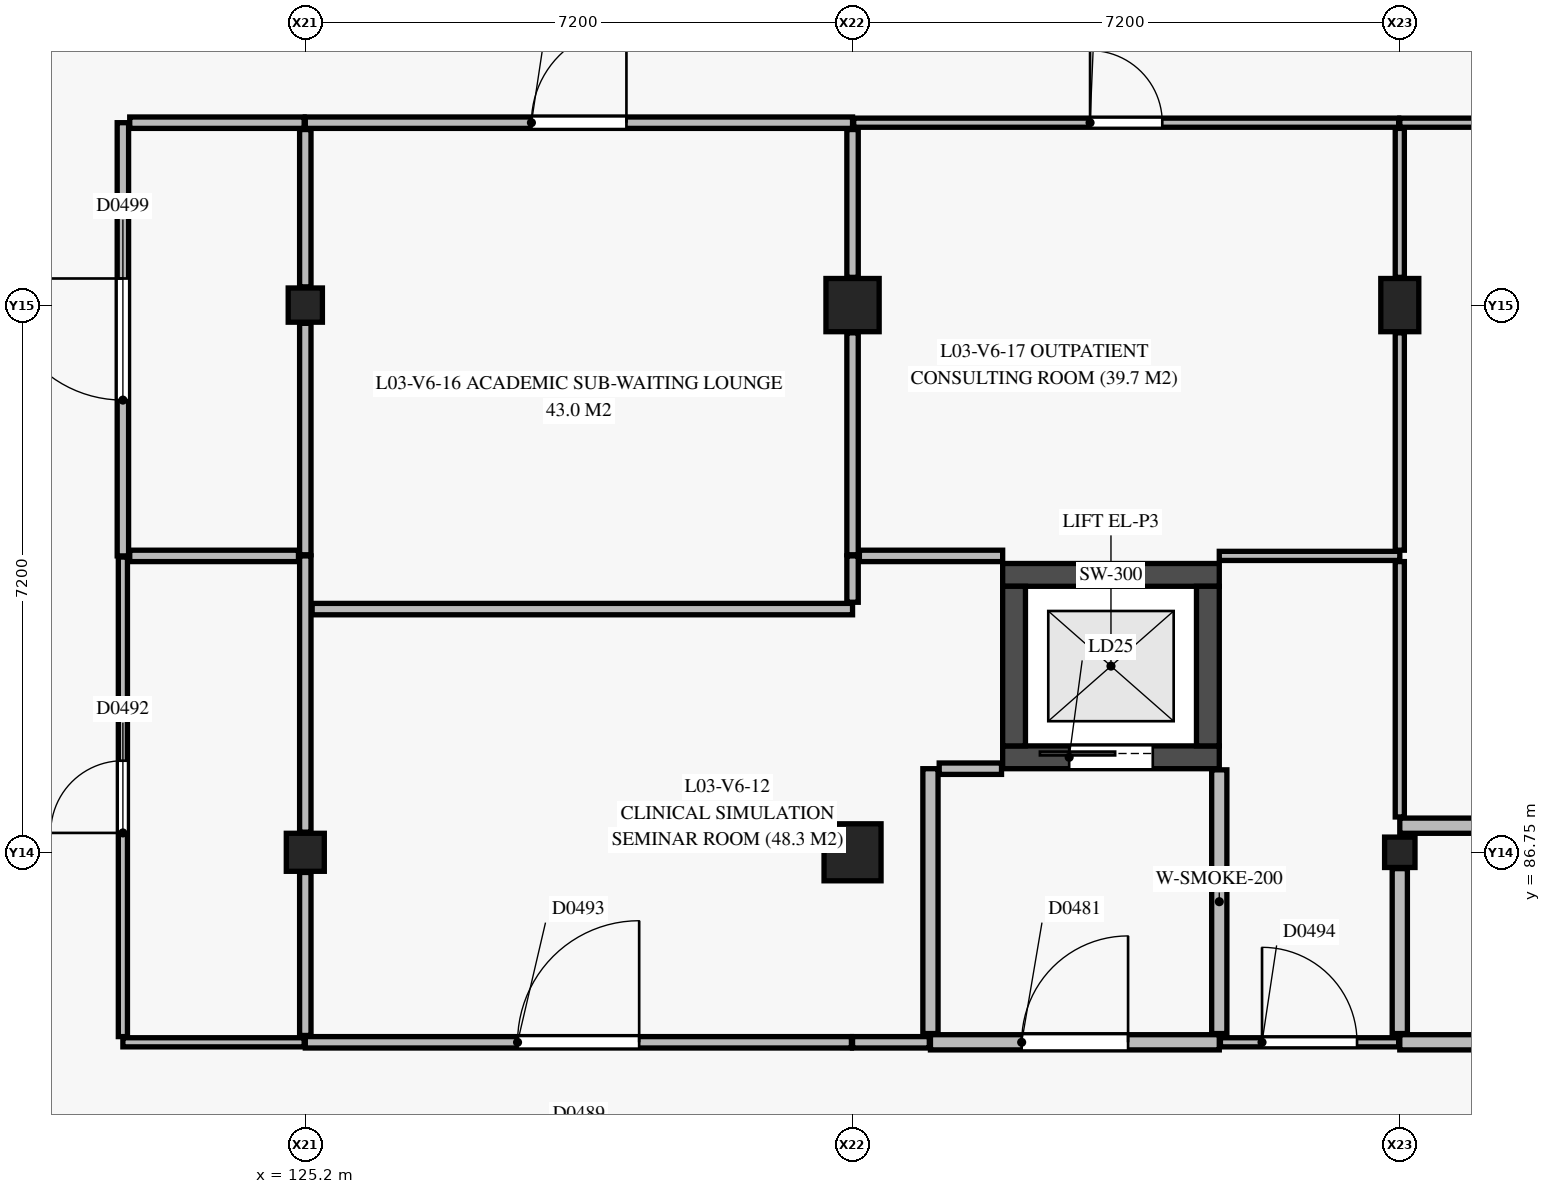
"""IFC4 building model, lengths in metres.
Left out: names, types, materials, properties, quantities, classifications, styles, units other than length and angle.
Written with IfcOpenShell. Run it as: python <this file> out.ifc"""

import sys

from ifc_helpers import new_model, si_unit, direction, frame, frame_2d, origin, origin_2d, place, context, subcontext, project, spatial, rectangle, extrude, element, fill, save


model = new_model("IFC4")
c1 = context("Model", 3, precision=1e-05, world=origin(), true_north=direction((0.0, 1.0)))
c2 = subcontext(c1, "Body", "Model", "MODEL_VIEW")
j1 = project(units=[si_unit("LENGTHUNIT", "METRE"), si_unit("PLANEANGLEUNIT", "RADIAN")], contexts=[c1])
p1 = place(None, origin())
s1 = spatial("IfcSite", under=j1, at=p1, CompositionType="ELEMENT")
p2 = place(p1, origin())
s2 = spatial("IfcBuilding", under=s1, at=p2, CompositionType="ELEMENT")
p3 = place(p2, frame((0.0, 0.0, 13.2)))
s3 = spatial("IfcBuildingStorey", under=s2, at=p3, CompositionType="ELEMENT", Elevation=13.2)
p4 = place(p3, frame((125.2, 86.75, 0.0), z_axis=(0.0, 0.0, 1.0), x_axis=(1.0, 0.0, 0.0)))
e1 = element("IfcColumn", 1, at=p4, inside=s3, PredefinedType="COLUMN", context=c2, shape_type="SweptSolid", body=[
    extrude(rectangle(XDim=0.5, YDim=0.5, at=origin_2d()), origin(), (0.0, 0.0, 1.0), 4.2),
])
p5 = place(p3, frame((125.2, 93.95, 0.0), z_axis=(0.0, 0.0, 1.0), x_axis=(1.0, 0.0, 0.0)))
e2 = element("IfcColumn", 2, at=p5, inside=s3, PredefinedType="COLUMN", context=c2, shape_type="SweptSolid", body=[
    extrude(rectangle(XDim=0.45, YDim=0.45, at=origin_2d()), origin(), (0.0, 0.0, 1.0), 4.2),
])
p6 = place(p3, frame((132.4, 86.75, 0.0), z_axis=(0.0, 0.0, 1.0), x_axis=(1.0, 0.0, 0.0)))
e3 = element("IfcColumn", 3, at=p6, inside=s3, PredefinedType="COLUMN", context=c2, shape_type="SweptSolid", body=[
    extrude(rectangle(XDim=0.75, YDim=0.75, at=origin_2d()), origin(), (0.0, 0.0, 1.0), 4.2),
])
p7 = place(p3, frame((132.4, 93.95, 0.0), z_axis=(0.0, 0.0, 1.0), x_axis=(1.0, 0.0, 0.0)))
e4 = element("IfcColumn", 4, at=p7, inside=s3, PredefinedType="COLUMN", context=c2, shape_type="SweptSolid", body=[
    extrude(rectangle(XDim=0.7, YDim=0.7, at=origin_2d()), origin(), (0.0, 0.0, 1.0), 4.2),
])
p8 = place(p3, frame((139.6, 86.75, 0.0), z_axis=(0.0, 0.0, 1.0), x_axis=(1.0, 0.0, 0.0)))
e5 = element("IfcColumn", 5, at=p8, inside=s3, PredefinedType="COLUMN", context=c2, shape_type="SweptSolid", body=[
    extrude(rectangle(XDim=0.4, YDim=0.4, at=origin_2d()), origin(), (0.0, 0.0, 1.0), 4.2),
])
p9 = place(p3, frame((139.6, 93.95, 0.0), z_axis=(0.0, 0.0, 1.0), x_axis=(1.0, 0.0, 0.0)))
e6 = element("IfcColumn", 6, at=p9, inside=s3, PredefinedType="COLUMN", context=c2, shape_type="SweptSolid", body=[
    extrude(rectangle(XDim=0.5, YDim=0.7, at=origin_2d()), origin(), (0.0, 0.0, 1.0), 4.2),
])
p10 = place(p3, frame((134.375, 88.0, 0.0), z_axis=(0.0, 0.0, 1.0), x_axis=(1.0, 0.0, 0.0)))
e7 = element("IfcWall", 7, at=p10, inside=s3, PredefinedType="SHEAR", context=c2, shape_type="SweptSolid", body=[
    extrude(rectangle(XDim=2.85, YDim=0.3, at=frame_2d((1.425, 0.0))), origin(), (0.0, 0.0, 1.0), 3.95),
])
p11 = place(p10, frame((0.875, 0.0, 0.0)))
e8 = element("IfcOpeningElement", 8, at=p11, cuts=e7, PredefinedType="OPENING", context=c2, shape_type="SweptSolid", body=[
    extrude(rectangle(XDim=1.1, YDim=2.15, at=frame_2d((0.55, 1.075))), frame((0.0, 0.16, 0.0), z_axis=(0.0, -1.0, 0.0), x_axis=(1.0, 0.0, 0.0)), (0.0, 0.0, 1.0), 0.32),
])
p12 = place(p3, frame((134.375, 90.4, 0.0), z_axis=(0.0, 0.0, 1.0), x_axis=(1.0, 0.0, 0.0)))
e9 = element("IfcWall", 9, at=p12, inside=s3, PredefinedType="SHEAR", context=c2, shape_type="SweptSolid", body=[
    extrude(rectangle(XDim=2.85, YDim=0.3, at=frame_2d((1.425, 0.0))), origin(), (0.0, 0.0, 1.0), 3.95),
])
for number, where, z_axis, x_axis in (
    (10, (134.525, 88.15, 0.0), (0.0, 0.0, 1.0), (0.0, 1.0, 0.0)),
    (11, (137.075, 88.15, 0.0), (0.0, 0.0, 1.0), (0.0, 1.0, 0.0)),
):
    element("IfcWall", number, at=place(p3, frame(where, z_axis=z_axis, x_axis=x_axis)), inside=s3, PredefinedType="SHEAR", context=c2, shape_type="SweptSolid", body=[
        extrude(rectangle(XDim=2.1, YDim=0.3, at=frame_2d((1.05, 0.0))), origin(), (0.0, 0.0, 1.0), 3.95),
    ])
p13 = place(p3, frame((133.425, 84.25, 0.0), z_axis=(0.0, 0.0, 1.0), x_axis=(1.0, 0.0, 0.0)))
e12 = element("IfcWall", 12, at=p13, inside=s3, PredefinedType="PARTITIONING", context=c2, shape_type="SweptSolid", body=[
    extrude(rectangle(XDim=3.8, YDim=0.2, at=frame_2d((1.9, 0.0))), origin(), (0.0, 0.0, 1.0), 3.475),
])
p14 = place(p13, frame((1.2, 0.0, 0.0)))
e13 = element("IfcOpeningElement", 13, at=p14, cuts=e12, PredefinedType="OPENING", context=c2, shape_type="SweptSolid", body=[
    extrude(rectangle(XDim=1.4, YDim=2.2, at=frame_2d((0.7, 1.1))), frame((0.0, 0.11, 0.0), z_axis=(0.0, -1.0, 0.0), x_axis=(1.0, 0.0, 0.0)), (0.0, 0.0, 1.0), 0.22),
])
p15 = place(p3, frame((137.225, 84.365, 0.0), z_axis=(0.0, 0.0, 1.0), x_axis=(0.0, 1.0, 0.0)))
e14 = element("IfcWall", 14, at=p15, inside=s3, PredefinedType="PARTITIONING", context=c2, shape_type="SweptSolid", body=[
    extrude(rectangle(XDim=3.47, YDim=0.2, at=frame_2d((1.735, 0.0))), origin(), (0.0, 0.0, 1.0), 3.415),
])
p16 = place(p3, frame((133.425, 84.365, 0.0), z_axis=(0.0, 0.0, 1.0), x_axis=(0.0, 1.0, 0.0)))
e15 = element("IfcWall", 15, at=p16, inside=s3, PredefinedType="PARTITIONING", context=c2, shape_type="SweptSolid", body=[
    extrude(rectangle(XDim=3.485, YDim=0.2, at=frame_2d((1.743, 0.0))), origin(), (0.0, 0.0, 1.0), 3.415),
])
p17 = place(p3, frame((139.6, 84.25, 0.0), z_axis=(0.0, 0.0, 1.0), x_axis=(1.0, 0.0, 0.0)))
e16 = element("IfcWall", 16, at=p17, inside=s3, PredefinedType="PARTITIONING", context=c2, shape_type="SweptSolid", body=[
    extrude(rectangle(XDim=4.685, YDim=0.2, at=frame_2d((2.342, 0.0))), origin(), (0.0, 0.0, 1.0), 3.355),
])
p18 = place(p3, frame((132.4, 84.25, 0.0), z_axis=(0.0, 0.0, 1.0), x_axis=(1.0, 0.0, 0.0)))
e17 = element("IfcWall", 17, at=p18, inside=s3, PredefinedType="PARTITIONING", context=c2, shape_type="SweptSolid", body=[
    extrude(rectangle(XDim=1.01, YDim=0.15, at=frame_2d((0.505, 0.0))), origin(), (0.0, 0.0, 1.0), 3.135),
])
p19 = place(p3, frame((125.2, 84.25, 0.0), z_axis=(0.0, 0.0, 1.0), x_axis=(1.0, 0.0, 0.0)))
e18 = element("IfcWall", 18, at=p19, inside=s3, PredefinedType="PARTITIONING", context=c2, shape_type="SweptSolid", body=[
    extrude(rectangle(XDim=7.185, YDim=0.15, at=frame_2d((3.593, 0.0))), origin(), (0.0, 0.0, 1.0), 3.135),
])
p20 = place(p19, frame((2.792, 0.0, 0.0)))
e19 = element("IfcOpeningElement", 19, at=p20, cuts=e18, PredefinedType="OPENING", context=c2, shape_type="SweptSolid", body=[
    extrude(rectangle(XDim=1.6, YDim=2.25, at=frame_2d((0.8, 1.125))), frame((0.0, 0.085, 0.0), z_axis=(0.0, -1.0, 0.0), x_axis=(1.0, 0.0, 0.0)), (0.0, 0.0, 1.0), 0.17),
])
p21 = place(p3, frame((125.2, 96.35, 0.0), z_axis=(0.0, 0.0, 1.0), x_axis=(1.0, 0.0, 0.0)))
e20 = element("IfcWall", 20, at=p21, inside=s3, PredefinedType="PARTITIONING", context=c2, shape_type="SweptSolid", body=[
    extrude(rectangle(XDim=7.2, YDim=0.15, at=frame_2d((3.6, 0.0))), origin(), (0.0, 0.0, 1.0), 3.355),
])
p22 = place(p21, frame((2.975, 0.0, 0.0)))
e21 = element("IfcOpeningElement", 21, at=p22, cuts=e20, PredefinedType="OPENING", context=c2, shape_type="SweptSolid", body=[
    extrude(rectangle(XDim=1.25, YDim=2.15, at=frame_2d((0.625, 1.075))), frame((0.0, 0.085, 0.0), z_axis=(0.0, -1.0, 0.0), x_axis=(1.0, 0.0, 0.0)), (0.0, 0.0, 1.0), 0.17),
])
p23 = place(p3, frame((122.8, 90.65, 0.0), z_axis=(0.0, 0.0, 1.0), x_axis=(0.0, 1.0, 0.0)))
e22 = element("IfcWall", 22, at=p23, inside=s3, PredefinedType="PARTITIONING", context=c2, shape_type="SweptSolid", body=[
    extrude(rectangle(XDim=5.7, YDim=0.15, at=frame_2d((2.85, 0.0))), origin(), (0.0, 0.0, 1.0), 3.415),
])
p24 = place(p23, frame((2.05, 0.0, 0.0)))
e23 = element("IfcOpeningElement", 23, at=p24, cuts=e22, PredefinedType="OPENING", context=c2, shape_type="SweptSolid", body=[
    extrude(rectangle(XDim=1.6, YDim=2.25, at=frame_2d((0.8, 1.125))), frame((0.0, 0.085, 0.0), z_axis=(0.0, -1.0, 0.0), x_axis=(1.0, 0.0, 0.0)), (0.0, 0.0, 1.0), 0.17),
])
p25 = place(p3, frame((122.89, 96.35, 0.0), z_axis=(0.0, 0.0, 1.0), x_axis=(1.0, 0.0, 0.0)))
e24 = element("IfcWall", 24, at=p25, inside=s3, PredefinedType="PARTITIONING", context=c2, shape_type="SweptSolid", body=[
    extrude(rectangle(XDim=2.295, YDim=0.15, at=frame_2d((1.147, 0.0))), origin(), (0.0, 0.0, 1.0), 3.385),
])
p26 = place(p3, frame((122.8, 84.25, 0.0), z_axis=(0.0, 0.0, 1.0), x_axis=(1.0, 0.0, 0.0)))
e25 = element("IfcWall", 25, at=p26, inside=s3, PredefinedType="PARTITIONING", context=c2, shape_type="SweptSolid", body=[
    extrude(rectangle(XDim=2.385, YDim=0.12, at=frame_2d((1.192, 0.0))), origin(), (0.0, 0.0, 1.0), 3.355),
])
p27 = place(p3, frame((122.8, 84.325, 0.0), z_axis=(0.0, 0.0, 1.0), x_axis=(0.0, 1.0, 0.0)))
e26 = element("IfcWall", 26, at=p27, inside=s3, PredefinedType="PARTITIONING", context=c2, shape_type="SweptSolid", body=[
    extrude(rectangle(XDim=6.31, YDim=0.12, at=frame_2d((3.155, 0.0))), origin(), (0.0, 0.0, 1.0), 3.285),
])
p28 = place(p27, frame((2.68, 0.0, 0.0)))
e27 = element("IfcOpeningElement", 27, at=p28, cuts=e26, PredefinedType="OPENING", context=c2, shape_type="SweptSolid", body=[
    extrude(rectangle(XDim=0.95, YDim=2.1, at=frame_2d((0.475, 1.05))), frame((0.0, 0.07, 0.0), z_axis=(0.0, -1.0, 0.0), x_axis=(1.0, 0.0, 0.0)), (0.0, 0.0, 1.0), 0.14),
])
p29 = place(p3, frame((137.24, 84.25, 0.0), z_axis=(0.0, 0.0, 1.0), x_axis=(1.0, 0.0, 0.0)))
e28 = element("IfcWall", 28, at=p29, inside=s3, PredefinedType="PARTITIONING", context=c2, shape_type="SweptSolid", body=[
    extrude(rectangle(XDim=2.345, YDim=0.12, at=frame_2d((1.172, 0.0))), origin(), (0.0, 0.0, 1.0), 3.355),
])
p30 = place(p29, frame((0.548, 0.0, 0.0)))
e29 = element("IfcOpeningElement", 29, at=p30, cuts=e28, PredefinedType="OPENING", context=c2, shape_type="SweptSolid", body=[
    extrude(rectangle(XDim=1.25, YDim=2.15, at=frame_2d((0.625, 1.075))), frame((0.0, 0.07, 0.0), z_axis=(0.0, -1.0, 0.0), x_axis=(1.0, 0.0, 0.0)), (0.0, 0.0, 1.0), 0.14),
])
p31 = place(p3, frame((139.6, 96.35, 0.0), z_axis=(0.0, 0.0, 1.0), x_axis=(1.0, 0.0, 0.0)))
e30 = element("IfcWall", 30, at=p31, inside=s3, PredefinedType="PARTITIONING", context=c2, shape_type="SweptSolid", body=[
    extrude(rectangle(XDim=4.725, YDim=0.12, at=frame_2d((2.362, 0.0))), origin(), (0.0, 0.0, 1.0), 3.95),
])
p32 = place(p31, frame((1.837, 0.0, 0.0)))
e31 = element("IfcOpeningElement", 31, at=p32, cuts=e30, PredefinedType="OPENING", context=c2, shape_type="SweptSolid", body=[
    extrude(rectangle(XDim=1.05, YDim=2.15, at=frame_2d((0.525, 1.075))), frame((0.0, 0.07, 0.0), z_axis=(0.0, -1.0, 0.0), x_axis=(1.0, 0.0, 0.0)), (0.0, 0.0, 1.0), 0.14),
])
p33 = place(p3, frame((132.415, 96.35, 0.0), z_axis=(0.0, 0.0, 1.0), x_axis=(1.0, 0.0, 0.0)))
e32 = element("IfcWall", 32, at=p33, inside=s3, PredefinedType="PARTITIONING", context=c2, shape_type="SweptSolid", body=[
    extrude(rectangle(XDim=7.17, YDim=0.12, at=frame_2d((3.585, 0.0))), origin(), (0.0, 0.0, 1.0), 3.355),
])
p34 = place(p33, frame((3.11, 0.0, 0.0)))
e33 = element("IfcOpeningElement", 33, at=p34, cuts=e32, PredefinedType="OPENING", context=c2, shape_type="SweptSolid", body=[
    extrude(rectangle(XDim=0.95, YDim=2.1, at=frame_2d((0.475, 1.05))), frame((0.0, 0.07, 0.0), z_axis=(0.0, -1.0, 0.0), x_axis=(1.0, 0.0, 0.0)), (0.0, 0.0, 1.0), 0.14),
])
p35 = place(p3, frame((139.6, 84.365, 0.0), z_axis=(0.0, 0.0, 1.0), x_axis=(0.0, 1.0, 0.0)))
e34 = element("IfcWall", 34, at=p35, inside=s3, PredefinedType="PARTITIONING", context=c2, shape_type="SweptSolid", body=[
    extrude(rectangle(XDim=2.17, YDim=0.2, at=frame_2d((1.085, 0.0))), origin(), (0.0, 0.0, 1.0), 3.355),
])
p36 = place(p3, frame((139.6, 87.1, 0.0), z_axis=(0.0, 0.0, 1.0), x_axis=(1.0, 0.0, 0.0)))
e35 = element("IfcWall", 35, at=p36, inside=s3, PredefinedType="PARTITIONING", context=c2, shape_type="SweptSolid", body=[
    extrude(rectangle(XDim=6.86, YDim=0.2, at=frame_2d((3.43, 0.0))), origin(), (0.0, 0.0, 1.0), 3.385),
])
p37 = place(p3, frame((125.2, 84.34, 0.0), z_axis=(0.0, 0.0, 1.0), x_axis=(0.0, 1.0, 0.0)))
e36 = element("IfcWall", 36, at=p37, inside=s3, PredefinedType="PARTITIONING", context=c2, shape_type="SweptSolid", body=[
    extrude(rectangle(XDim=2.145, YDim=0.15, at=frame_2d((1.073, 0.0))), origin(), (0.0, 0.0, 1.0), 3.355),
])
p38 = place(p3, frame((125.2, 87.015, 0.0), z_axis=(0.0, 0.0, 1.0), x_axis=(0.0, 1.0, 0.0)))
e37 = element("IfcWall", 37, at=p38, inside=s3, PredefinedType="PARTITIONING", context=c2, shape_type="SweptSolid", body=[
    extrude(rectangle(XDim=3.635, YDim=0.15, at=frame_2d((1.817, 0.0))), origin(), (0.0, 0.0, 1.0), 3.355),
])
p39 = place(p3, frame((122.89, 90.65, 0.0), z_axis=(0.0, 0.0, 1.0), x_axis=(1.0, 0.0, 0.0)))
e38 = element("IfcWall", 38, at=p39, inside=s3, PredefinedType="PARTITIONING", context=c2, shape_type="SweptSolid", body=[
    extrude(rectangle(XDim=2.22, YDim=0.15, at=frame_2d((1.11, 0.0))), origin(), (0.0, 0.0, 1.0), 3.355),
])
p40 = place(p3, frame((125.29, 89.95, 0.0), z_axis=(0.0, 0.0, 1.0), x_axis=(1.0, 0.0, 0.0)))
e39 = element("IfcWall", 39, at=p40, inside=s3, PredefinedType="PARTITIONING", context=c2, shape_type="SweptSolid", body=[
    extrude(rectangle(XDim=7.11, YDim=0.15, at=frame_2d((3.555, 0.0))), origin(), (0.0, 0.0, 1.0), 3.235),
])
p41 = place(p3, frame((132.4, 90.04, 0.0), z_axis=(0.0, 0.0, 1.0), x_axis=(0.0, 1.0, 0.0)))
e40 = element("IfcWall", 40, at=p41, inside=s3, PredefinedType="PARTITIONING", context=c2, shape_type="SweptSolid", body=[
    extrude(rectangle(XDim=0.61, YDim=0.15, at=frame_2d((0.305, 0.0))), origin(), (0.0, 0.0, 1.0), 3.235),
])
p42 = place(p3, frame((132.49, 90.65, 0.0), z_axis=(0.0, 0.0, 1.0), x_axis=(1.0, 0.0, 0.0)))
e41 = element("IfcWall", 41, at=p42, inside=s3, PredefinedType="PARTITIONING", context=c2, shape_type="SweptSolid", body=[
    extrude(rectangle(XDim=1.885, YDim=0.15, at=frame_2d((0.942, 0.0))), origin(), (0.0, 0.0, 1.0), 3.235),
])
p43 = place(p3, frame((133.54, 87.85, 0.0), z_axis=(0.0, 0.0, 1.0), x_axis=(1.0, 0.0, 0.0)))
e42 = element("IfcWall", 42, at=p43, inside=s3, PredefinedType="PARTITIONING", context=c2, shape_type="SweptSolid", body=[
    extrude(rectangle(XDim=0.82, YDim=0.15, at=frame_2d((0.41, 0.0))), origin(), (0.0, 0.0, 1.0), 3.95),
])
p44 = place(p3, frame((132.4, 90.665, 0.0), z_axis=(0.0, 0.0, 1.0), x_axis=(0.0, 1.0, 0.0)))
e43 = element("IfcWall", 43, at=p44, inside=s3, PredefinedType="PARTITIONING", context=c2, shape_type="SweptSolid", body=[
    extrude(rectangle(XDim=2.92, YDim=0.15, at=frame_2d((1.46, 0.0))), origin(), (0.0, 0.0, 1.0), 3.235),
])
p45 = place(p3, frame((132.4, 94.315, 0.0), z_axis=(0.0, 0.0, 1.0), x_axis=(0.0, 1.0, 0.0)))
e44 = element("IfcWall", 44, at=p45, inside=s3, PredefinedType="PARTITIONING", context=c2, shape_type="SweptSolid", body=[
    extrude(rectangle(XDim=1.945, YDim=0.15, at=frame_2d((0.973, 0.0))), origin(), (0.0, 0.0, 1.0), 3.355),
])
p46 = place(p3, frame((125.2, 90.665, 0.0), z_axis=(0.0, 0.0, 1.0), x_axis=(0.0, 1.0, 0.0)))
e45 = element("IfcWall", 45, at=p46, inside=s3, PredefinedType="PARTITIONING", context=c2, shape_type="SweptSolid", body=[
    extrude(rectangle(XDim=3.045, YDim=0.15, at=frame_2d((1.522, 0.0))), origin(), (0.0, 0.0, 1.0), 3.355),
])
p47 = place(p3, frame((125.2, 94.19, 0.0), z_axis=(0.0, 0.0, 1.0), x_axis=(0.0, 1.0, 0.0)))
e46 = element("IfcWall", 46, at=p47, inside=s3, PredefinedType="PARTITIONING", context=c2, shape_type="SweptSolid", body=[
    extrude(rectangle(XDim=2.07, YDim=0.15, at=frame_2d((1.035, 0.0))), origin(), (0.0, 0.0, 1.0), 3.385),
])
p48 = place(p3, frame((137.225, 90.65, 0.0), z_axis=(0.0, 0.0, 1.0), x_axis=(1.0, 0.0, 0.0)))
e47 = element("IfcWall", 47, at=p48, inside=s3, PredefinedType="PARTITIONING", context=c2, shape_type="SweptSolid", body=[
    extrude(rectangle(XDim=2.375, YDim=0.12, at=frame_2d((1.188, 0.0))), origin(), (0.0, 0.0, 1.0), 3.385),
])
p49 = place(p3, frame((139.6, 87.215, 0.0), z_axis=(0.0, 0.0, 1.0), x_axis=(0.0, 1.0, 0.0)))
e48 = element("IfcWall", 48, at=p49, inside=s3, PredefinedType="PARTITIONING", context=c2, shape_type="SweptSolid", body=[
    extrude(rectangle(XDim=3.36, YDim=0.12, at=frame_2d((1.68, 0.0))), origin(), (0.0, 0.0, 1.0), 3.385),
])
p50 = place(p3, frame((139.6, 90.725, 0.0), z_axis=(0.0, 0.0, 1.0), x_axis=(0.0, 1.0, 0.0)))
e49 = element("IfcWall", 49, at=p50, inside=s3, PredefinedType="PARTITIONING", context=c2, shape_type="SweptSolid", body=[
    extrude(rectangle(XDim=2.86, YDim=0.12, at=frame_2d((1.43, 0.0))), origin(), (0.0, 0.0, 1.0), 3.385),
])
p51 = place(p3, frame((139.6, 94.315, 0.0), z_axis=(0.0, 0.0, 1.0), x_axis=(0.0, 1.0, 0.0)))
e50 = element("IfcWall", 50, at=p51, inside=s3, PredefinedType="PARTITIONING", context=c2, shape_type="SweptSolid", body=[
    extrude(rectangle(XDim=1.96, YDim=0.12, at=frame_2d((0.98, 0.0))), origin(), (0.0, 0.0, 1.0), 3.95),
])
p52 = place(p11, origin())
e51 = element("IfcDoor", 51, at=p52, inside=s3, OperationType="SLIDING_TO_LEFT", PredefinedType="DOOR", context=c2, shape_type="SweptSolid", body=[
    extrude(rectangle(XDim=1.1, YDim=2.15, at=frame_2d((0.55, 1.075))), frame((0.0, 0.025, 0.0), z_axis=(0.0, -1.0, 0.0), x_axis=(1.0, 0.0, 0.0)), (0.0, 0.0, 1.0), 0.05),
])
fill(e8, e51)
p53 = place(p14, origin())
e52 = element("IfcDoor", 52, at=p53, inside=s3, OperationType="SINGLE_SWING_RIGHT", PredefinedType="DOOR", context=c2, shape_type="SweptSolid", body=[
    extrude(rectangle(XDim=1.4, YDim=2.2, at=frame_2d((0.7, 1.1))), frame((0.0, 0.025, 0.0), z_axis=(0.0, -1.0, 0.0), x_axis=(1.0, 0.0, 0.0)), (0.0, 0.0, 1.0), 0.05),
])
fill(e13, e52)
p54 = place(p28, origin())
e53 = element("IfcDoor", 53, at=p54, inside=s3, OperationType="SINGLE_SWING_LEFT", PredefinedType="DOOR", context=c2, shape_type="SweptSolid", body=[
    extrude(rectangle(XDim=0.95, YDim=2.1, at=frame_2d((0.475, 1.05))), frame((0.0, 0.025, 0.0), z_axis=(0.0, -1.0, 0.0), x_axis=(1.0, 0.0, 0.0)), (0.0, 0.0, 1.0), 0.05),
])
fill(e27, e53)
p55 = place(p20, origin())
e54 = element("IfcDoor", 54, at=p55, inside=s3, OperationType="SINGLE_SWING_RIGHT", PredefinedType="DOOR", context=c2, shape_type="SweptSolid", body=[
    extrude(rectangle(XDim=1.6, YDim=2.25, at=frame_2d((0.8, 1.125))), frame((0.0, 0.025, 0.0), z_axis=(0.0, -1.0, 0.0), x_axis=(1.0, 0.0, 0.0)), (0.0, 0.0, 1.0), 0.05),
])
fill(e19, e54)
p56 = place(p30, origin())
e55 = element("IfcDoor", 55, at=p56, inside=s3, OperationType="SINGLE_SWING_LEFT", PredefinedType="DOOR", context=c2, shape_type="SweptSolid", body=[
    extrude(rectangle(XDim=1.25, YDim=2.15, at=frame_2d((0.625, 1.075))), frame((0.0, 0.025, 0.0), z_axis=(0.0, -1.0, 0.0), x_axis=(1.0, 0.0, 0.0)), (0.0, 0.0, 1.0), 0.05),
])
fill(e29, e55)
p57 = place(p22, origin())
e56 = element("IfcDoor", 56, at=p57, inside=s3, OperationType="SINGLE_SWING_RIGHT", PredefinedType="DOOR", context=c2, shape_type="SweptSolid", body=[
    extrude(rectangle(XDim=1.25, YDim=2.15, at=frame_2d((0.625, 1.075))), frame((0.0, 0.025, 0.0), z_axis=(0.0, -1.0, 0.0), x_axis=(1.0, 0.0, 0.0)), (0.0, 0.0, 1.0), 0.05),
])
fill(e21, e56)
p58 = place(p34, origin())
e57 = element("IfcDoor", 57, at=p58, inside=s3, OperationType="SINGLE_SWING_LEFT", PredefinedType="DOOR", context=c2, shape_type="SweptSolid", body=[
    extrude(rectangle(XDim=0.95, YDim=2.1, at=frame_2d((0.475, 1.05))), frame((0.0, 0.025, 0.0), z_axis=(0.0, -1.0, 0.0), x_axis=(1.0, 0.0, 0.0)), (0.0, 0.0, 1.0), 0.05),
])
fill(e33, e57)
p59 = place(p24, origin())
e58 = element("IfcDoor", 58, at=p59, inside=s3, OperationType="SINGLE_SWING_RIGHT", PredefinedType="DOOR", context=c2, shape_type="SweptSolid", body=[
    extrude(rectangle(XDim=1.6, YDim=2.25, at=frame_2d((0.8, 1.125))), frame((0.0, 0.025, 0.0), z_axis=(0.0, -1.0, 0.0), x_axis=(1.0, 0.0, 0.0)), (0.0, 0.0, 1.0), 0.05),
])
fill(e23, e58)
save(model, sys.argv[1])
